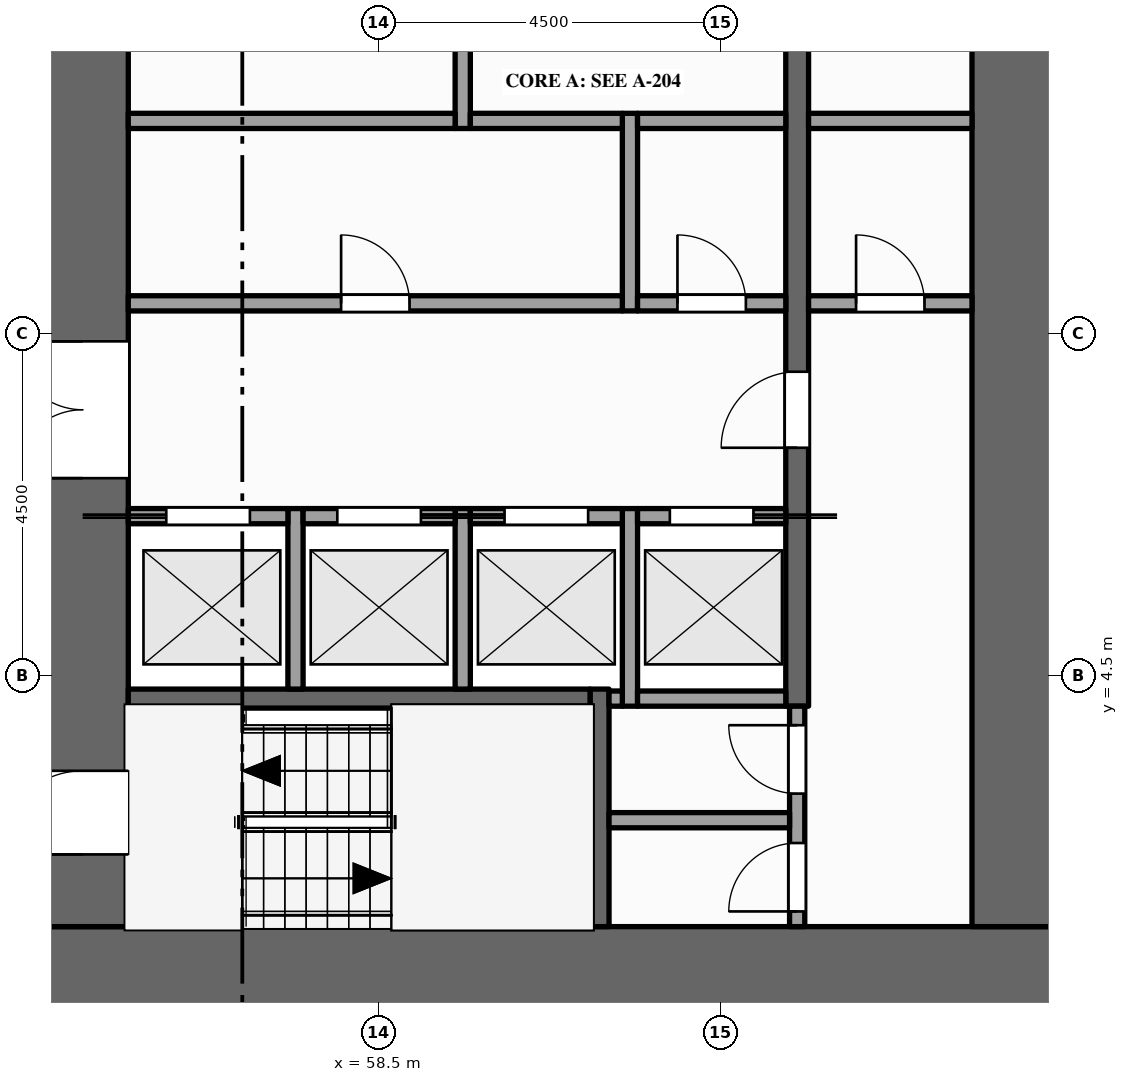
"""IFC4 building model, lengths in metres.
Left out: names, types, materials, properties, quantities, classifications, styles, units other than length and angle.
Written with IfcOpenShell. Run it as: python <this file> out.ifc"""

import sys

from ifc_helpers import new_model, si_unit, direction, frame, frame_2d, origin, place, context, subcontext, project, spatial, rectangle, extrude, element, fill, save


model = new_model("IFC4")
c1 = context("Model", 3, precision=1e-05, world=origin(), true_north=direction((0.0, 1.0)))
c2 = subcontext(c1, "Body", "Model", "MODEL_VIEW")
j1 = project(units=[si_unit("LENGTHUNIT", "METRE"), si_unit("PLANEANGLEUNIT", "RADIAN")], contexts=[c1])
p1 = place(None, origin())
s1 = spatial("IfcSite", under=j1, at=p1, CompositionType="ELEMENT")
p2 = place(p1, origin())
s2 = spatial("IfcBuilding", under=s1, at=p2, CompositionType="ELEMENT")
p3 = place(p2, frame((0.0, 0.0, 19.0)))
s3 = spatial("IfcBuildingStorey", under=s2, at=p3, CompositionType="ELEMENT", Elevation=19.0)
p4 = place(p3, frame((67.5, 0.6, -0.15), z_axis=(0.0, 0.0, 1.0), x_axis=(-1.0, 0.0, 0.0)))
e1 = element("IfcWall", 1, at=p4, inside=s3, PredefinedType="SHEAR", context=c2, shape_type="SweptSolid", body=[
    extrude(rectangle(XDim=13.5, YDim=1.2, at=frame_2d((6.75, 0.0))), origin(), (0.0, 0.0, 1.0), 5.0),
])
p5 = place(p3, frame((54.6, 1.2, -0.15), z_axis=(0.0, 0.0, 1.0), x_axis=(0.0, 1.0, 0.0)))
e2 = element("IfcWall", 2, at=p5, inside=s3, PredefinedType="SHEAR", context=c2, shape_type="SweptSolid", body=[
    extrude(rectangle(XDim=20.1, YDim=1.2, at=frame_2d((10.05, 0.0))), origin(), (0.0, 0.0, 1.0), 5.0),
])
p6 = place(p5, frame((5.9, 0.0, 0.15)))
e3 = element("IfcOpeningElement", 3, at=p6, cuts=e2, PredefinedType="OPENING", context=c2, shape_type="SweptSolid", body=[
    extrude(rectangle(XDim=1.8, YDim=2.1, at=frame_2d((0.9, 1.05))), frame((0.0, 0.61, 0.0), z_axis=(0.0, -1.0, 0.0), x_axis=(1.0, 0.0, 0.0)), (0.0, 0.0, 1.0), 1.22),
])
p7 = place(p5, frame((11.95, 0.0, 0.15)))
e4 = element("IfcOpeningElement", 4, at=p7, cuts=e2, PredefinedType="OPENING", context=c2, shape_type="SweptSolid", body=[
    extrude(rectangle(XDim=1.1, YDim=2.1, at=frame_2d((0.55, 1.05))), frame((0.0, 0.61, 0.0), z_axis=(0.0, -1.0, 0.0), x_axis=(1.0, 0.0, 0.0)), (0.0, 0.0, 1.0), 1.22),
])
p8 = place(p5, frame((0.95, 0.0, 0.15)))
e5 = element("IfcOpeningElement", 5, at=p8, cuts=e2, PredefinedType="OPENING", context=c2, shape_type="SweptSolid", body=[
    extrude(rectangle(XDim=1.1, YDim=2.1, at=frame_2d((0.55, 1.05))), frame((0.0, 0.61, 0.0), z_axis=(0.0, -1.0, 0.0), x_axis=(1.0, 0.0, 0.0)), (0.0, 0.0, 1.0), 1.22),
])
p9 = place(p5, frame((18.15, 0.0, 0.15)))
e6 = element("IfcOpeningElement", 6, at=p9, cuts=e2, PredefinedType="OPENING", context=c2, shape_type="SweptSolid", body=[
    extrude(rectangle(XDim=1.1, YDim=2.1, at=frame_2d((0.55, 1.05))), frame((0.0, 0.61, 0.0), z_axis=(0.0, -1.0, 0.0), x_axis=(1.0, 0.0, 0.0)), (0.0, 0.0, 1.0), 1.22),
])
p10 = place(p3, frame((66.9, 1.2, -0.15), z_axis=(0.0, 0.0, 1.0), x_axis=(0.0, 1.0, 0.0)))
e7 = element("IfcWall", 7, at=p10, inside=s3, PredefinedType="SHEAR", context=c2, shape_type="SweptSolid", body=[
    extrude(rectangle(XDim=20.1, YDim=1.2, at=frame_2d((10.05, 0.0))), origin(), (0.0, 0.0, 1.0), 5.0),
])
for number, where, z_axis, x_axis in (
    (8, (57.4, 4.325, 0.0), (0.0, 0.0, 1.0), (0.0, 1.0, 0.0)),
    (9, (59.6, 4.325, 0.0), (0.0, 0.0, 1.0), (0.0, 1.0, 0.0)),
):
    element("IfcWall", number, at=place(p3, frame(where, z_axis=z_axis, x_axis=x_axis)), inside=s3, PredefinedType="SOLIDWALL", context=c2, shape_type="SweptSolid", body=[
        extrude(rectangle(XDim=2.375, YDim=0.2, at=frame_2d((1.188, 0.0))), origin(), (0.0, 0.0, 1.0), 4.75),
    ])
p11 = place(p3, frame((59.6, 11.7, 0.0), z_axis=(0.0, 0.0, 1.0), x_axis=(0.0, 1.0, 0.0)))
e10 = element("IfcWall", 10, at=p11, inside=s3, PredefinedType="PARTITIONING", context=c2, shape_type="SweptSolid", body=[
    extrude(rectangle(XDim=3.8, YDim=0.2, at=frame_2d((1.9, 0.0))), origin(), (0.0, 0.0, 1.0), 4.75),
])
p12 = place(p11, frame((1.5, 0.0, 0.0)))
e11 = element("IfcOpeningElement", 11, at=p12, cuts=e10, PredefinedType="OPENING", context=c2, shape_type="SweptSolid", body=[
    extrude(rectangle(XDim=1.0, YDim=2.1, at=frame_2d((0.5, 1.05))), frame((0.0, 0.11, 0.0), z_axis=(0.0, -1.0, 0.0), x_axis=(1.0, 0.0, 0.0)), (0.0, 0.0, 1.0), 0.22),
])
p13 = place(p3, frame((61.4, 1.2, 0.0), z_axis=(0.0, 0.0, 1.0), x_axis=(0.0, 1.0, 0.0)))
e12 = element("IfcWall", 12, at=p13, inside=s3, PredefinedType="SHEAR", context=c2, shape_type="SweptSolid", body=[
    extrude(rectangle(XDim=3.125, YDim=0.25, at=frame_2d((1.562, 0.0))), origin(), (0.0, 0.0, 1.0), 4.75),
])
p14 = place(p3, frame((61.8, 4.1, 0.0), z_axis=(0.0, 0.0, 1.0), x_axis=(0.0, 1.0, 0.0)))
e13 = element("IfcWall", 13, at=p14, inside=s3, PredefinedType="SOLIDWALL", context=c2, shape_type="SweptSolid", body=[
    extrude(rectangle(XDim=2.6, YDim=0.2, at=frame_2d((1.3, 0.0))), origin(), (0.0, 0.0, 1.0), 4.75),
])
p15 = place(p3, frame((61.8, 9.3, 0.0), z_axis=(0.0, 0.0, 1.0), x_axis=(0.0, 1.0, 0.0)))
e14 = element("IfcWall", 14, at=p15, inside=s3, PredefinedType="PARTITIONING", context=c2, shape_type="SweptSolid", body=[
    extrude(rectangle(XDim=2.6, YDim=0.2, at=frame_2d((1.3, 0.0))), origin(), (0.0, 0.0, 1.0), 4.75),
])
p16 = place(p3, frame((64.0, 1.2, 0.0), z_axis=(0.0, 0.0, 1.0), x_axis=(0.0, 1.0, 0.0)))
e15 = element("IfcWall", 15, at=p16, inside=s3, PredefinedType="PARTITIONING", context=c2, shape_type="SweptSolid", body=[
    extrude(rectangle(XDim=2.9, YDim=0.2, at=frame_2d((1.45, 0.0))), origin(), (0.0, 0.0, 1.0), 4.75),
])
p17 = place(p16, frame((0.2, 0.0, 0.0)))
e16 = element("IfcOpeningElement", 16, at=p17, cuts=e15, PredefinedType="OPENING", context=c2, shape_type="SweptSolid", body=[
    extrude(rectangle(XDim=0.9, YDim=2.1, at=frame_2d((0.45, 1.05))), frame((0.0, 0.11, 0.0), z_axis=(0.0, -1.0, 0.0), x_axis=(1.0, 0.0, 0.0)), (0.0, 0.0, 1.0), 0.22),
])
p18 = place(p16, frame((1.75, 0.0, 0.0)))
e17 = element("IfcOpeningElement", 17, at=p18, cuts=e15, PredefinedType="OPENING", context=c2, shape_type="SweptSolid", body=[
    extrude(rectangle(XDim=0.9, YDim=2.1, at=frame_2d((0.45, 1.05))), frame((0.0, 0.11, 0.0), z_axis=(0.0, -1.0, 0.0), x_axis=(1.0, 0.0, 0.0)), (0.0, 0.0, 1.0), 0.22),
])
p19 = place(p3, frame((64.0, 4.1, 0.0), z_axis=(0.0, 0.0, 1.0), x_axis=(0.0, 1.0, 0.0)))
e18 = element("IfcWall", 18, at=p19, inside=s3, PredefinedType="SHEAR", context=c2, shape_type="SweptSolid", body=[
    extrude(rectangle(XDim=14.5, YDim=0.3, at=frame_2d((7.25, 0.0))), origin(), (0.0, 0.0, 1.0), 4.75),
])
p20 = place(p19, frame((3.4, 0.0, 0.0)))
e19 = element("IfcOpeningElement", 19, at=p20, cuts=e18, PredefinedType="OPENING", context=c2, shape_type="SweptSolid", body=[
    extrude(rectangle(XDim=1.0, YDim=2.1, at=frame_2d((0.5, 1.05))), frame((0.0, 0.16, 0.0), z_axis=(0.0, -1.0, 0.0), x_axis=(1.0, 0.0, 0.0)), (0.0, 0.0, 1.0), 0.32),
])
p21 = place(p19, frame((9.1, 0.0, 0.0)))
e20 = element("IfcOpeningElement", 20, at=p21, cuts=e18, PredefinedType="OPENING", context=c2, shape_type="SweptSolid", body=[
    extrude(rectangle(XDim=1.0, YDim=2.1, at=frame_2d((0.5, 1.05))), frame((0.0, 0.16, 0.0), z_axis=(0.0, -1.0, 0.0), x_axis=(1.0, 0.0, 0.0)), (0.0, 0.0, 1.0), 0.32),
])
p22 = place(p3, frame((61.525, 2.6, 0.0), z_axis=(0.0, 0.0, 1.0), x_axis=(1.0, 0.0, 0.0)))
e21 = element("IfcWall", 21, at=p22, inside=s3, PredefinedType="PARTITIONING", context=c2, shape_type="SweptSolid", body=[
    extrude(rectangle(XDim=2.375, YDim=0.2, at=frame_2d((1.188, 0.0))), origin(), (0.0, 0.0, 1.0), 4.75),
])
p23 = place(p3, frame((55.2, 4.2, 0.0), z_axis=(0.0, 0.0, 1.0), x_axis=(1.0, 0.0, 0.0)))
e22 = element("IfcWall", 22, at=p23, inside=s3, PredefinedType="SHEAR", context=c2, shape_type="SweptSolid", body=[
    extrude(rectangle(XDim=6.075, YDim=0.25, at=frame_2d((3.038, 0.0))), origin(), (0.0, 0.0, 1.0), 4.75),
])
p24 = place(p3, frame((61.525, 4.2, 0.0), z_axis=(0.0, 0.0, 1.0), x_axis=(1.0, 0.0, 0.0)))
e23 = element("IfcWall", 23, at=p24, inside=s3, PredefinedType="SOLIDWALL", context=c2, shape_type="SweptSolid", body=[
    extrude(rectangle(XDim=0.175, YDim=0.2, at=frame_2d((0.087, 0.0))), origin(), (0.0, 0.0, 1.0), 4.75),
])
p25 = place(p3, frame((61.9, 4.2, 0.0), z_axis=(0.0, 0.0, 1.0), x_axis=(1.0, 0.0, 0.0)))
e24 = element("IfcWall", 24, at=p25, inside=s3, PredefinedType="SOLIDWALL", context=c2, shape_type="SweptSolid", body=[
    extrude(rectangle(XDim=1.95, YDim=0.2, at=frame_2d((0.975, 0.0))), origin(), (0.0, 0.0, 1.0), 4.75),
])
p26 = place(p3, frame((55.2, 6.6, 0.0), z_axis=(0.0, 0.0, 1.0), x_axis=(1.0, 0.0, 0.0)))
e25 = element("IfcWall", 25, at=p26, inside=s3, PredefinedType="SOLIDWALL", context=c2, shape_type="SweptSolid", body=[
    extrude(rectangle(XDim=2.1, YDim=0.2, at=frame_2d((1.05, 0.0))), origin(), (0.0, 0.0, 1.0), 4.75),
])
p27 = place(p26, frame((0.5, 0.0, 0.012)))
e26 = element("IfcOpeningElement", 26, at=p27, cuts=e25, PredefinedType="OPENING", context=c2, shape_type="SweptSolid", body=[
    extrude(rectangle(XDim=1.1, YDim=2.1, at=frame_2d((0.55, 1.05))), frame((0.0, 0.11, 0.0), z_axis=(0.0, -1.0, 0.0), x_axis=(1.0, 0.0, 0.0)), (0.0, 0.0, 1.0), 0.22),
])
p28 = place(p3, frame((57.5, 6.6, 0.0), z_axis=(0.0, 0.0, 1.0), x_axis=(1.0, 0.0, 0.0)))
e27 = element("IfcWall", 27, at=p28, inside=s3, PredefinedType="SOLIDWALL", context=c2, shape_type="SweptSolid", body=[
    extrude(rectangle(XDim=2.0, YDim=0.2, at=frame_2d((1.0, 0.0))), origin(), (0.0, 0.0, 1.0), 4.75),
])
p29 = place(p28, frame((0.45, 0.0, 0.012)))
e28 = element("IfcOpeningElement", 28, at=p29, cuts=e27, PredefinedType="OPENING", context=c2, shape_type="SweptSolid", body=[
    extrude(rectangle(XDim=1.1, YDim=2.1, at=frame_2d((0.55, 1.05))), frame((0.0, 0.11, 0.0), z_axis=(0.0, -1.0, 0.0), x_axis=(1.0, 0.0, 0.0)), (0.0, 0.0, 1.0), 0.22),
])
p30 = place(p3, frame((59.7, 6.6, 0.0), z_axis=(0.0, 0.0, 1.0), x_axis=(1.0, 0.0, 0.0)))
e29 = element("IfcWall", 29, at=p30, inside=s3, PredefinedType="SOLIDWALL", context=c2, shape_type="SweptSolid", body=[
    extrude(rectangle(XDim=2.0, YDim=0.2, at=frame_2d((1.0, 0.0))), origin(), (0.0, 0.0, 1.0), 4.75),
])
p31 = place(p30, frame((0.45, 0.0, 0.012)))
e30 = element("IfcOpeningElement", 30, at=p31, cuts=e29, PredefinedType="OPENING", context=c2, shape_type="SweptSolid", body=[
    extrude(rectangle(XDim=1.1, YDim=2.1, at=frame_2d((0.55, 1.05))), frame((0.0, 0.11, 0.0), z_axis=(0.0, -1.0, 0.0), x_axis=(1.0, 0.0, 0.0)), (0.0, 0.0, 1.0), 0.22),
])
p32 = place(p3, frame((61.9, 6.6, 0.0), z_axis=(0.0, 0.0, 1.0), x_axis=(1.0, 0.0, 0.0)))
e31 = element("IfcWall", 31, at=p32, inside=s3, PredefinedType="SOLIDWALL", context=c2, shape_type="SweptSolid", body=[
    extrude(rectangle(XDim=1.95, YDim=0.2, at=frame_2d((0.975, 0.0))), origin(), (0.0, 0.0, 1.0), 4.75),
])
p33 = place(p32, frame((0.425, 0.0, 0.012)))
e32 = element("IfcOpeningElement", 32, at=p33, cuts=e31, PredefinedType="OPENING", context=c2, shape_type="SweptSolid", body=[
    extrude(rectangle(XDim=1.1, YDim=2.1, at=frame_2d((0.55, 1.05))), frame((0.0, 0.11, 0.0), z_axis=(0.0, -1.0, 0.0), x_axis=(1.0, 0.0, 0.0)), (0.0, 0.0, 1.0), 0.22),
])
p34 = place(p3, frame((55.2, 9.4, 0.0), z_axis=(0.0, 0.0, 1.0), x_axis=(1.0, 0.0, 0.0)))
e33 = element("IfcWall", 33, at=p34, inside=s3, PredefinedType="PARTITIONING", context=c2, shape_type="SweptSolid", body=[
    extrude(rectangle(XDim=6.5, YDim=0.2, at=frame_2d((3.25, 0.0))), origin(), (0.0, 0.0, 1.0), 4.75),
])
p35 = place(p34, frame((2.8, 0.0, 0.0)))
e34 = element("IfcOpeningElement", 34, at=p35, cuts=e33, PredefinedType="OPENING", context=c2, shape_type="SweptSolid", body=[
    extrude(rectangle(XDim=0.9, YDim=2.1, at=frame_2d((0.45, 1.05))), frame((0.0, 0.11, 0.0), z_axis=(0.0, -1.0, 0.0), x_axis=(1.0, 0.0, 0.0)), (0.0, 0.0, 1.0), 0.22),
])
p36 = place(p3, frame((61.9, 9.4, 0.0), z_axis=(0.0, 0.0, 1.0), x_axis=(1.0, 0.0, 0.0)))
e35 = element("IfcWall", 35, at=p36, inside=s3, PredefinedType="PARTITIONING", context=c2, shape_type="SweptSolid", body=[
    extrude(rectangle(XDim=1.95, YDim=0.2, at=frame_2d((0.975, 0.0))), origin(), (0.0, 0.0, 1.0), 4.75),
])
p37 = place(p36, frame((0.525, 0.0, 0.0)))
e36 = element("IfcOpeningElement", 36, at=p37, cuts=e35, PredefinedType="OPENING", context=c2, shape_type="SweptSolid", body=[
    extrude(rectangle(XDim=0.9, YDim=2.1, at=frame_2d((0.45, 1.05))), frame((0.0, 0.11, 0.0), z_axis=(0.0, -1.0, 0.0), x_axis=(1.0, 0.0, 0.0)), (0.0, 0.0, 1.0), 0.22),
])
p38 = place(p3, frame((64.15, 9.4, 0.0), z_axis=(0.0, 0.0, 1.0), x_axis=(1.0, 0.0, 0.0)))
e37 = element("IfcWall", 37, at=p38, inside=s3, PredefinedType="PARTITIONING", context=c2, shape_type="SweptSolid", body=[
    extrude(rectangle(XDim=2.15, YDim=0.2, at=frame_2d((1.075, 0.0))), origin(), (0.0, 0.0, 1.0), 4.75),
])
p39 = place(p38, frame((0.625, 0.0, 0.0)))
e38 = element("IfcOpeningElement", 38, at=p39, cuts=e37, PredefinedType="OPENING", context=c2, shape_type="SweptSolid", body=[
    extrude(rectangle(XDim=0.9, YDim=2.1, at=frame_2d((0.45, 1.05))), frame((0.0, 0.11, 0.0), z_axis=(0.0, -1.0, 0.0), x_axis=(1.0, 0.0, 0.0)), (0.0, 0.0, 1.0), 0.22),
])
p40 = place(p3, frame((55.2, 11.8, 0.0), z_axis=(0.0, 0.0, 1.0), x_axis=(1.0, 0.0, 0.0)))
e39 = element("IfcWall", 39, at=p40, inside=s3, PredefinedType="PARTITIONING", context=c2, shape_type="SweptSolid", body=[
    extrude(rectangle(XDim=4.3, YDim=0.2, at=frame_2d((2.15, 0.0))), origin(), (0.0, 0.0, 1.0), 4.75),
])
p41 = place(p3, frame((59.7, 11.8, 0.0), z_axis=(0.0, 0.0, 1.0), x_axis=(1.0, 0.0, 0.0)))
e40 = element("IfcWall", 40, at=p41, inside=s3, PredefinedType="PARTITIONING", context=c2, shape_type="SweptSolid", body=[
    extrude(rectangle(XDim=2.0, YDim=0.2, at=frame_2d((1.0, 0.0))), origin(), (0.0, 0.0, 1.0), 4.75),
])
p42 = place(p3, frame((61.9, 11.8, 0.0), z_axis=(0.0, 0.0, 1.0), x_axis=(1.0, 0.0, 0.0)))
e41 = element("IfcWall", 41, at=p42, inside=s3, PredefinedType="PARTITIONING", context=c2, shape_type="SweptSolid", body=[
    extrude(rectangle(XDim=1.95, YDim=0.2, at=frame_2d((0.975, 0.0))), origin(), (0.0, 0.0, 1.0), 4.75),
])
p43 = place(p3, frame((64.15, 11.8, 0.0), z_axis=(0.0, 0.0, 1.0), x_axis=(1.0, 0.0, 0.0)))
e42 = element("IfcWall", 42, at=p43, inside=s3, PredefinedType="PARTITIONING", context=c2, shape_type="SweptSolid", body=[
    extrude(rectangle(XDim=2.15, YDim=0.2, at=frame_2d((1.075, 0.0))), origin(), (0.0, 0.0, 1.0), 4.75),
])
p44 = place(p27, origin())
e43 = element("IfcDoor", 43, at=p44, inside=s3, OperationType="SLIDING_TO_LEFT", PredefinedType="DOOR", context=c2, shape_type="SweptSolid", body=[
    extrude(rectangle(XDim=1.1, YDim=2.1, at=frame_2d((0.55, 1.05))), frame((0.0, 0.025, 0.0), z_axis=(0.0, -1.0, 0.0), x_axis=(1.0, 0.0, 0.0)), (0.0, 0.0, 1.0), 0.05),
])
fill(e26, e43)
p45 = place(p29, origin())
e44 = element("IfcDoor", 44, at=p45, inside=s3, OperationType="SLIDING_TO_RIGHT", PredefinedType="DOOR", context=c2, shape_type="SweptSolid", body=[
    extrude(rectangle(XDim=1.1, YDim=2.1, at=frame_2d((0.55, 1.05))), frame((0.0, 0.025, 0.0), z_axis=(0.0, -1.0, 0.0), x_axis=(1.0, 0.0, 0.0)), (0.0, 0.0, 1.0), 0.05),
])
fill(e28, e44)
p46 = place(p31, origin())
e45 = element("IfcDoor", 45, at=p46, inside=s3, OperationType="SLIDING_TO_LEFT", PredefinedType="DOOR", context=c2, shape_type="SweptSolid", body=[
    extrude(rectangle(XDim=1.1, YDim=2.1, at=frame_2d((0.55, 1.05))), frame((0.0, 0.025, 0.0), z_axis=(0.0, -1.0, 0.0), x_axis=(1.0, 0.0, 0.0)), (0.0, 0.0, 1.0), 0.05),
])
fill(e30, e45)
p47 = place(p33, origin())
e46 = element("IfcDoor", 46, at=p47, inside=s3, OperationType="SLIDING_TO_RIGHT", PredefinedType="DOOR", context=c2, shape_type="SweptSolid", body=[
    extrude(rectangle(XDim=1.1, YDim=2.1, at=frame_2d((0.55, 1.05))), frame((0.0, 0.025, 0.0), z_axis=(0.0, -1.0, 0.0), x_axis=(1.0, 0.0, 0.0)), (0.0, 0.0, 1.0), 0.05),
])
fill(e32, e46)
p48 = place(p6, origin())
e47 = element("IfcDoor", 47, at=p48, inside=s3, OperationType="DOUBLE_DOOR_SINGLE_SWING", PredefinedType="DOOR", context=c2, shape_type="SweptSolid", body=[
    extrude(rectangle(XDim=1.8, YDim=2.1, at=frame_2d((0.9, 1.05))), frame((0.0, 0.025, 0.0), z_axis=(0.0, -1.0, 0.0), x_axis=(1.0, 0.0, 0.0)), (0.0, 0.0, 1.0), 0.05),
])
fill(e3, e47)
p49 = place(p20, origin())
e48 = element("IfcDoor", 48, at=p49, inside=s3, OperationType="SINGLE_SWING_LEFT", PredefinedType="DOOR", context=c2, shape_type="SweptSolid", body=[
    extrude(rectangle(XDim=1.0, YDim=2.1, at=frame_2d((0.5, 1.05))), frame((0.0, 0.025, 0.0), z_axis=(0.0, -1.0, 0.0), x_axis=(1.0, 0.0, 0.0)), (0.0, 0.0, 1.0), 0.05),
])
fill(e19, e48)
p50 = place(p39, origin())
e49 = element("IfcDoor", 49, at=p50, inside=s3, OperationType="SINGLE_SWING_LEFT", PredefinedType="DOOR", context=c2, shape_type="SweptSolid", body=[
    extrude(rectangle(XDim=0.9, YDim=2.1, at=frame_2d((0.45, 1.05))), frame((0.0, 0.025, 0.0), z_axis=(0.0, -1.0, 0.0), x_axis=(1.0, 0.0, 0.0)), (0.0, 0.0, 1.0), 0.05),
])
fill(e38, e49)
p51 = place(p8, origin())
e50 = element("IfcDoor", 50, at=p51, inside=s3, OperationType="SINGLE_SWING_LEFT", PredefinedType="DOOR", context=c2, shape_type="SweptSolid", body=[
    extrude(rectangle(XDim=1.1, YDim=2.1, at=frame_2d((0.55, 1.05))), frame((0.0, 0.025, 0.0), z_axis=(0.0, -1.0, 0.0), x_axis=(1.0, 0.0, 0.0)), (0.0, 0.0, 1.0), 0.05),
])
fill(e5, e50)
p52 = place(p17, origin())
e51 = element("IfcDoor", 51, at=p52, inside=s3, OperationType="SINGLE_SWING_LEFT", PredefinedType="DOOR", context=c2, shape_type="SweptSolid", body=[
    extrude(rectangle(XDim=0.9, YDim=2.1, at=frame_2d((0.45, 1.05))), frame((0.0, 0.025, 0.0), z_axis=(0.0, -1.0, 0.0), x_axis=(1.0, 0.0, 0.0)), (0.0, 0.0, 1.0), 0.05),
])
fill(e16, e51)
p53 = place(p18, origin())
e52 = element("IfcDoor", 52, at=p53, inside=s3, OperationType="SINGLE_SWING_RIGHT", PredefinedType="DOOR", context=c2, shape_type="SweptSolid", body=[
    extrude(rectangle(XDim=0.9, YDim=2.1, at=frame_2d((0.45, 1.05))), frame((0.0, 0.025, 0.0), z_axis=(0.0, -1.0, 0.0), x_axis=(1.0, 0.0, 0.0)), (0.0, 0.0, 1.0), 0.05),
])
fill(e17, e52)
p54 = place(p35, origin())
e53 = element("IfcDoor", 53, at=p54, inside=s3, OperationType="SINGLE_SWING_LEFT", PredefinedType="DOOR", context=c2, shape_type="SweptSolid", body=[
    extrude(rectangle(XDim=0.9, YDim=2.1, at=frame_2d((0.45, 1.05))), frame((0.0, 0.025, 0.0), z_axis=(0.0, -1.0, 0.0), x_axis=(1.0, 0.0, 0.0)), (0.0, 0.0, 1.0), 0.05),
])
fill(e34, e53)
p55 = place(p37, origin())
e54 = element("IfcDoor", 54, at=p55, inside=s3, OperationType="SINGLE_SWING_LEFT", PredefinedType="DOOR", context=c2, shape_type="SweptSolid", body=[
    extrude(rectangle(XDim=0.9, YDim=2.1, at=frame_2d((0.45, 1.05))), frame((0.0, 0.025, 0.0), z_axis=(0.0, -1.0, 0.0), x_axis=(1.0, 0.0, 0.0)), (0.0, 0.0, 1.0), 0.05),
])
fill(e36, e54)
save(model, sys.argv[1])
